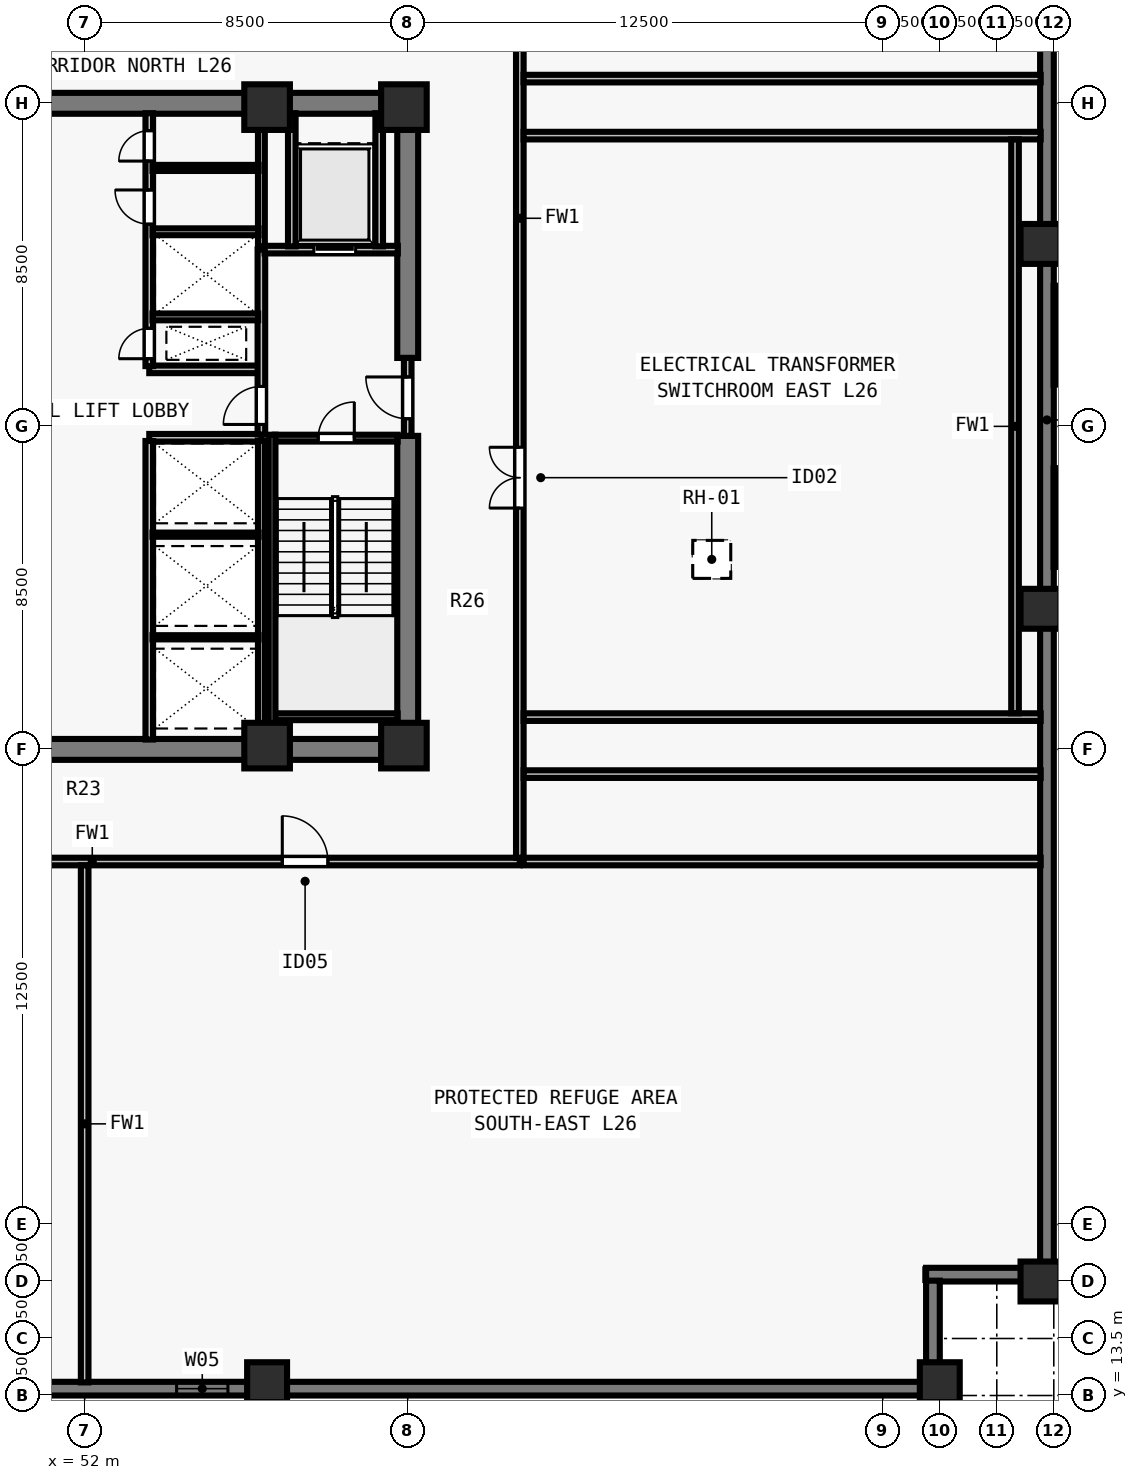
"""IFC4 building model, lengths in metres.
Left out: names, types, materials, properties, quantities, classifications, styles, units other than length and angle.
Written with IfcOpenShell. Run it as: python <this file> out.ifc"""

import sys

from ifc_helpers import new_model, si_unit, direction, frame, frame_2d, origin, origin_2d, place, context, subcontext, project, spatial, rectangle, extrude, element, fill, save


model = new_model("IFC4")
c1 = context("Model", 3, precision=1e-05, world=origin(), true_north=direction((0.0, 1.0)))
c2 = subcontext(c1, "Body", "Model", "MODEL_VIEW")
j1 = project(units=[si_unit("LENGTHUNIT", "METRE"), si_unit("PLANEANGLEUNIT", "RADIAN")], contexts=[c1])
p1 = place(None, origin())
s1 = spatial("IfcSite", under=j1, at=p1, CompositionType="ELEMENT")
p2 = place(p1, origin())
s2 = spatial("IfcBuilding", under=s1, at=p2, CompositionType="ELEMENT")
p3 = place(p2, frame((0.0, 0.0, 97.0)))
s3 = spatial("IfcBuildingStorey", under=s2, at=p3, CompositionType="ELEMENT", Elevation=97.0)
for number, where, z_axis, x_axis in (
    (1, (56.8, 30.6, 0.0), (0.0, 0.0, 1.0), (1.0, 0.0, 0.0)),
    (2, (60.4, 30.6, 0.0), (0.0, 0.0, 1.0), (1.0, 0.0, 0.0)),
    (3, (56.8, 47.4, 0.0), (0.0, 0.0, 1.0), (1.0, 0.0, 0.0)),
    (4, (60.4, 47.4, 0.0), (0.0, 0.0, 1.0), (1.0, 0.0, 0.0)),
):
    element("IfcColumn", number, at=place(p3, frame(where, z_axis=z_axis, x_axis=x_axis)), inside=s3, PredefinedType="COLUMN", context=c2, shape_type="SweptSolid", body=[
        extrude(rectangle(XDim=1.2, YDim=1.2, at=origin_2d()), origin(), (0.0, 0.0, 1.0), 4.5),
    ])
for number, where, z_axis, x_axis in (
    (5, (56.8, 13.85, 0.0), (0.0, 0.0, 1.0), (1.0, 0.0, 0.0)),
    (6, (74.5, 13.85, 0.0), (0.0, 0.0, 1.0), (1.0, 0.0, 0.0)),
    (7, (77.15, 16.5, 0.0), (0.0, 0.0, 1.0), (0.0, 1.0, 0.0)),
    (8, (77.15, 34.2, 0.0), (0.0, 0.0, 1.0), (0.0, 1.0, 0.0)),
    (9, (77.15, 43.8, 0.0), (0.0, 0.0, 1.0), (0.0, 1.0, 0.0)),
):
    element("IfcColumn", number, at=place(p3, frame(where, z_axis=z_axis, x_axis=x_axis)), inside=s3, PredefinedType="COLUMN", context=c2, shape_type="SweptSolid", body=[
        extrude(rectangle(XDim=1.05, YDim=1.05, at=origin_2d()), origin(), (0.0, 0.0, 1.0), 4.5),
    ])
p4 = place(p3, frame((77.32, 61.5, 0.0), z_axis=(0.0, 0.0, 1.0), x_axis=(0.0, -1.0, 0.0)))
e10 = element("IfcWall", 10, at=p4, inside=s3, PredefinedType="SOLIDWALL", context=c2, shape_type="SweptSolid", body=[
    extrude(rectangle(XDim=44.662, YDim=0.36, at=frame_2d((22.331, 0.0))), origin(), (0.0, 0.0, 1.0), 4.28),
])
p5 = place(p3, frame((77.5, 16.68, 0.0), z_axis=(0.0, 0.0, 1.0), x_axis=(-1.0, 0.0, 0.0)))
e11 = element("IfcWall", 11, at=p5, inside=s3, PredefinedType="SOLIDWALL", context=c2, shape_type="SweptSolid", body=[
    extrude(rectangle(XDim=3.36, YDim=0.36, at=frame_2d((1.68, 0.0))), origin(), (0.0, 0.0, 1.0), 4.28),
])
p6 = place(p3, frame((74.32, 16.522, 0.0), z_axis=(0.0, 0.0, 1.0), x_axis=(0.0, -1.0, 0.0)))
e12 = element("IfcWall", 12, at=p6, inside=s3, PredefinedType="SOLIDWALL", context=c2, shape_type="SweptSolid", body=[
    extrude(rectangle(XDim=2.684, YDim=0.36, at=frame_2d((1.342, 0.0))), origin(), (0.0, 0.0, 1.0), 4.28),
])
p7 = place(p3, frame((74.5, 13.68, 0.0), z_axis=(0.0, 0.0, 1.0), x_axis=(-1.0, 0.0, 0.0)))
e13 = element("IfcWall", 13, at=p7, inside=s3, PredefinedType="SOLIDWALL", context=c2, shape_type="SweptSolid", body=[
    extrude(rectangle(XDim=44.662, YDim=0.36, at=frame_2d((22.331, 0.0))), origin(), (0.0, 0.0, 1.0), 4.28),
])
p8 = place(p7, frame((18.731, 0.0, 0.8)))
e14 = element("IfcOpeningElement", 14, at=p8, cuts=e13, PredefinedType="OPENING", context=c2, shape_type="SweptSolid", body=[
    extrude(rectangle(XDim=1.35, YDim=1.53, at=frame_2d((0.675, 0.765))), frame((0.0, 0.19, 0.0), z_axis=(0.0, -1.0, 0.0), x_axis=(1.0, 0.0, 0.0)), (0.0, 0.0, 1.0), 0.38),
])
for number, where, z_axis, x_axis in (
    (15, (43.225, 30.5, 0.0), (0.0, 0.0, 1.0), (1.0, 0.0, 0.0)),
    (16, (43.225, 47.5, 0.0), (0.0, 0.0, 1.0), (1.0, 0.0, 0.0)),
):
    element("IfcWall", number, at=place(p3, frame(where, z_axis=z_axis, x_axis=x_axis)), inside=s3, PredefinedType="SHEAR", context=c2, shape_type="SweptSolid", body=[
        extrude(rectangle(XDim=17.55, YDim=0.55, at=frame_2d((8.775, 0.0))), origin(), (0.0, 0.0, 1.0), 4.28),
    ])
p9 = place(p3, frame((60.5, 30.765, 0.0), z_axis=(0.0, 0.0, 1.0), x_axis=(0.0, 1.0, 0.0)))
e17 = element("IfcWall", 17, at=p9, inside=s3, PredefinedType="SHEAR", context=c2, shape_type="SweptSolid", body=[
    extrude(rectangle(XDim=7.985, YDim=0.55, at=frame_2d((3.993, 0.0))), origin(), (0.0, 0.0, 1.0), 4.28),
])
p10 = place(p3, frame((60.5, 40.8, 0.0), z_axis=(0.0, 0.0, 1.0), x_axis=(0.0, 1.0, 0.0)))
e18 = element("IfcWall", 18, at=p10, inside=s3, PredefinedType="SHEAR", context=c2, shape_type="SweptSolid", body=[
    extrude(rectangle(XDim=6.435, YDim=0.55, at=frame_2d((3.218, 0.0))), origin(), (0.0, 0.0, 1.0), 4.28),
])
for number, where, z_axis, x_axis in (
    (19, (53.7, 38.7, 0.0), (0.0, 0.0, 1.0), (1.0, 0.0, 0.0)),
    (20, (53.7, 40.5, 0.0), (0.0, 0.0, 1.0), (1.0, 0.0, 0.0)),
):
    element("IfcWall", number, at=place(p3, frame(where, z_axis=z_axis, x_axis=x_axis)), inside=s3, PredefinedType="SOLIDWALL", context=c2, shape_type="SweptSolid", body=[
        extrude(rectangle(XDim=2.95, YDim=0.2, at=frame_2d((1.475, 0.0))), origin(), (0.0, 0.0, 1.0), 4.28),
    ])
p11 = place(p3, frame((53.7, 30.76, 0.0), z_axis=(0.0, 0.0, 1.0), x_axis=(0.0, 1.0, 0.0)))
e21 = element("IfcWall", 21, at=p11, inside=s3, PredefinedType="SOLIDWALL", context=c2, shape_type="SweptSolid", body=[
    extrude(rectangle(XDim=7.855, YDim=0.2, at=frame_2d((3.927, 0.0))), origin(), (0.0, 0.0, 1.0), 4.28),
])
p12 = place(p3, frame((53.7, 40.585, 0.0), z_axis=(0.0, 0.0, 1.0), x_axis=(0.0, 1.0, 0.0)))
e22 = element("IfcWall", 22, at=p12, inside=s3, PredefinedType="SOLIDWALL", context=c2, shape_type="SweptSolid", body=[
    extrude(rectangle(XDim=6.655, YDim=0.2, at=frame_2d((3.328, 0.0))), origin(), (0.0, 0.0, 1.0), 4.28),
])
p13 = place(p12, frame((0.195, 0.0, 0.0)))
e23 = element("IfcOpeningElement", 23, at=p13, cuts=e22, PredefinedType="OPENING", context=c2, shape_type="SweptSolid", body=[
    extrude(rectangle(XDim=0.8, YDim=2.08, at=frame_2d((0.4, 1.04))), frame((0.0, 0.11, 0.0), z_axis=(0.0, -1.0, 0.0), x_axis=(1.0, 0.0, 0.0)), (0.0, 0.0, 1.0), 0.22),
])
p14 = place(p12, frame((3.735, 0.0, 0.0)))
e24 = element("IfcOpeningElement", 24, at=p14, cuts=e22, PredefinedType="OPENING", context=c2, shape_type="SweptSolid", body=[
    extrude(rectangle(XDim=0.9, YDim=2.12, at=frame_2d((0.45, 1.06))), frame((0.0, 0.11, 0.0), z_axis=(0.0, -1.0, 0.0), x_axis=(1.0, 0.0, 0.0)), (0.0, 0.0, 1.0), 0.22),
])
p15 = place(p12, frame((5.395, 0.0, 0.0)))
e25 = element("IfcOpeningElement", 25, at=p15, cuts=e22, PredefinedType="OPENING", context=c2, shape_type="SweptSolid", body=[
    extrude(rectangle(XDim=0.8, YDim=2.1, at=frame_2d((0.4, 1.05))), frame((0.0, 0.11, 0.0), z_axis=(0.0, -1.0, 0.0), x_axis=(1.0, 0.0, 0.0)), (0.0, 0.0, 1.0), 0.22),
])
p16 = place(p3, frame((60.5, 38.75, 0.0), z_axis=(0.0, 0.0, 1.0), x_axis=(0.0, 1.0, 0.0)))
e26 = element("IfcWall", 26, at=p16, inside=s3, PredefinedType="SOLIDWALL", context=c2, shape_type="SweptSolid", body=[
    extrude(rectangle(XDim=2.05, YDim=0.2, at=frame_2d((1.025, 0.0))), origin(), (0.0, 0.0, 1.0), 4.28),
])
p17 = place(p16, frame((0.45, 0.0, 0.0)))
e27 = element("IfcOpeningElement", 27, at=p17, cuts=e26, PredefinedType="OPENING", context=c2, shape_type="SweptSolid", body=[
    extrude(rectangle(XDim=1.1, YDim=2.15, at=frame_2d((0.55, 1.075))), frame((0.0, 0.11, 0.0), z_axis=(0.0, -1.0, 0.0), x_axis=(1.0, 0.0, 0.0)), (0.0, 0.0, 1.0), 0.22),
])
p18 = place(p3, frame((56.65, 38.785, 0.0), z_axis=(0.0, 0.0, 1.0), x_axis=(0.0, 1.0, 0.0)))
e28 = element("IfcWall", 28, at=p18, inside=s3, PredefinedType="SOLIDWALL", context=c2, shape_type="SweptSolid", body=[
    extrude(rectangle(XDim=4.865, YDim=0.2, at=frame_2d((2.433, 0.0))), origin(), (0.0, 0.0, 1.0), 4.28),
])
p19 = place(p18, frame((0.265, 0.0, 0.0)))
e29 = element("IfcOpeningElement", 29, at=p19, cuts=e28, PredefinedType="OPENING", context=c2, shape_type="SweptSolid", body=[
    extrude(rectangle(XDim=1.0, YDim=2.15, at=frame_2d((0.5, 1.075))), frame((0.0, 0.11, 0.0), z_axis=(0.0, -1.0, 0.0), x_axis=(1.0, 0.0, 0.0)), (0.0, 0.0, 1.0), 0.22),
])
p20 = place(p3, frame((56.735, 43.65, 0.0), z_axis=(0.0, 0.0, 1.0), x_axis=(1.0, 0.0, 0.0)))
e30 = element("IfcWall", 30, at=p20, inside=s3, PredefinedType="SOLIDWALL", context=c2, shape_type="SweptSolid", body=[
    extrude(rectangle(XDim=3.505, YDim=0.2, at=frame_2d((1.752, 0.0))), origin(), (0.0, 0.0, 1.0), 4.28),
])
p21 = place(p20, frame((1.295, 0.0, 0.0)))
e31 = element("IfcOpeningElement", 31, at=p21, cuts=e30, PredefinedType="OPENING", context=c2, shape_type="SweptSolid", body=[
    extrude(rectangle(XDim=1.1, YDim=2.2, at=frame_2d((0.55, 1.1))), frame((0.0, 0.11, 0.0), z_axis=(0.0, -1.0, 0.0), x_axis=(1.0, 0.0, 0.0)), (0.0, 0.0, 1.0), 0.22),
])
for number, where, z_axis, x_axis in (
    (32, (57.45, 43.735, 0.0), (0.0, 0.0, 1.0), (0.0, 1.0, 0.0)),
    (33, (59.75, 43.735, 0.0), (0.0, 0.0, 1.0), (0.0, 1.0, 0.0)),
):
    element("IfcWall", number, at=place(p3, frame(where, z_axis=z_axis, x_axis=x_axis)), inside=s3, PredefinedType="SOLIDWALL", context=c2, shape_type="SweptSolid", body=[
        extrude(rectangle(XDim=3.505, YDim=0.2, at=frame_2d((1.752, 0.0))), origin(), (0.0, 0.0, 1.0), 4.28),
    ])
p22 = place(p3, frame((56.65, 30.76, 0.0), z_axis=(0.0, 0.0, 1.0), x_axis=(0.0, 1.0, 0.0)))
e34 = element("IfcWall", 34, at=p22, inside=s3, PredefinedType="SOLIDWALL", context=c2, shape_type="SweptSolid", body=[
    extrude(rectangle(XDim=7.855, YDim=0.18, at=frame_2d((3.927, 0.0))), origin(), (0.0, 0.0, 1.0), 4.28),
])
for number, where, z_axis, x_axis in (
    (35, (53.785, 33.45, 0.0), (0.0, 0.0, 1.0), (1.0, 0.0, 0.0)),
    (36, (53.785, 36.15, 0.0), (0.0, 0.0, 1.0), (1.0, 0.0, 0.0)),
):
    element("IfcWall", number, at=place(p3, frame(where, z_axis=z_axis, x_axis=x_axis)), inside=s3, PredefinedType="PARTITIONING", context=c2, shape_type="SweptSolid", body=[
        extrude(rectangle(XDim=2.79, YDim=0.11, at=frame_2d((1.395, 0.0))), origin(), (0.0, 0.0, 1.0), 4.28),
    ])
p23 = place(p3, frame((56.65, 43.735, 0.0), z_axis=(0.0, 0.0, 1.0), x_axis=(0.0, 1.0, 0.0)))
e37 = element("IfcWall", 37, at=p23, inside=s3, PredefinedType="SOLIDWALL", context=c2, shape_type="SweptSolid", body=[
    extrude(rectangle(XDim=3.505, YDim=0.18, at=frame_2d((1.752, 0.0))), origin(), (0.0, 0.0, 1.0), 4.28),
])
p24 = place(p3, frame((53.785, 41.88, 0.0), z_axis=(0.0, 0.0, 1.0), x_axis=(1.0, 0.0, 0.0)))
e38 = element("IfcWall", 38, at=p24, inside=s3, PredefinedType="SOLIDWALL", context=c2, shape_type="SweptSolid", body=[
    extrude(rectangle(XDim=2.78, YDim=0.18, at=frame_2d((1.39, 0.0))), origin(), (0.0, 0.0, 1.0), 4.28),
])
p25 = place(p3, frame((53.785, 44.12, 0.0), z_axis=(0.0, 0.0, 1.0), x_axis=(1.0, 0.0, 0.0)))
e39 = element("IfcWall", 39, at=p25, inside=s3, PredefinedType="SOLIDWALL", context=c2, shape_type="SweptSolid", body=[
    extrude(rectangle(XDim=2.79, YDim=0.18, at=frame_2d((1.395, 0.0))), origin(), (0.0, 0.0, 1.0), 4.28),
])
p26 = place(p3, frame((53.785, 45.8, 0.0), z_axis=(0.0, 0.0, 1.0), x_axis=(1.0, 0.0, 0.0)))
e40 = element("IfcWall", 40, at=p26, inside=s3, PredefinedType="PARTITIONING", context=c2, shape_type="SweptSolid", body=[
    extrude(rectangle(XDim=2.79, YDim=0.16, at=frame_2d((1.395, 0.0))), origin(), (0.0, 0.0, 1.0), 4.28),
])
p27 = place(p3, frame((40.55, 27.55, 0.0), z_axis=(0.0, 0.0, 1.0), x_axis=(1.0, 0.0, 0.0)))
e41 = element("IfcWall", 41, at=p27, inside=s3, PredefinedType="SOLIDWALL", context=c2, shape_type="SweptSolid", body=[
    extrude(rectangle(XDim=22.9, YDim=0.2, at=frame_2d((11.45, 0.0))), origin(), (0.0, 0.0, 1.0), 4.28),
])
p28 = place(p27, frame((5.45, 0.0, 0.0)))
e42 = element("IfcOpeningElement", 42, at=p28, cuts=e41, PredefinedType="OPENING", context=c2, shape_type="SweptSolid", body=[
    extrude(rectangle(XDim=1.2, YDim=2.15, at=frame_2d((0.6, 1.075))), frame((0.0, 0.11, 0.0), z_axis=(0.0, -1.0, 0.0), x_axis=(1.0, 0.0, 0.0)), (0.0, 0.0, 1.0), 0.22),
])
p29 = place(p27, frame((16.65, 0.0, 0.0)))
e43 = element("IfcOpeningElement", 43, at=p29, cuts=e41, PredefinedType="OPENING", context=c2, shape_type="SweptSolid", body=[
    extrude(rectangle(XDim=1.2, YDim=2.15, at=frame_2d((0.6, 1.075))), frame((0.0, 0.11, 0.0), z_axis=(0.0, -1.0, 0.0), x_axis=(1.0, 0.0, 0.0)), (0.0, 0.0, 1.0), 0.22),
])
p30 = place(p3, frame((63.45, 27.65, 0.0), z_axis=(0.0, 0.0, 1.0), x_axis=(0.0, 1.0, 0.0)))
e44 = element("IfcWall", 44, at=p30, inside=s3, PredefinedType="SOLIDWALL", context=c2, shape_type="SweptSolid", body=[
    extrude(rectangle(XDim=22.7, YDim=0.2, at=frame_2d((11.35, 0.0))), origin(), (0.0, 0.0, 1.0), 4.28),
])
p31 = place(p30, frame((9.2, 0.0, 0.0)))
e45 = element("IfcOpeningElement", 45, at=p31, cuts=e44, PredefinedType="OPENING", context=c2, shape_type="SweptSolid", body=[
    extrude(rectangle(XDim=1.6, YDim=2.2, at=frame_2d((0.8, 1.1))), frame((0.0, 0.11, 0.0), z_axis=(0.0, -1.0, 0.0), x_axis=(1.0, 0.0, 0.0)), (0.0, 0.0, 1.0), 0.22),
])
p32 = place(p3, frame((63.55, 29.85, 0.0), z_axis=(0.0, 0.0, 1.0), x_axis=(1.0, 0.0, 0.0)))
e46 = element("IfcWall", 46, at=p32, inside=s3, PredefinedType="SOLIDWALL", context=c2, shape_type="SweptSolid", body=[
    extrude(rectangle(XDim=13.605, YDim=0.2, at=frame_2d((6.802, 0.0))), origin(), (0.0, 0.0, 1.0), 4.28),
])
for number, where, z_axis, x_axis in (
    (47, (63.55, 31.35, 0.0), (0.0, 0.0, 1.0), (1.0, 0.0, 0.0)),
    (48, (63.55, 46.65, 0.0), (0.0, 0.0, 1.0), (1.0, 0.0, 0.0)),
):
    element("IfcWall", number, at=place(p3, frame(where, z_axis=z_axis, x_axis=x_axis)), inside=s3, PredefinedType="SOLIDWALL", context=c2, shape_type="SweptSolid", body=[
        extrude(rectangle(XDim=13.605, YDim=0.2, at=frame_2d((6.802, 0.0))), origin(), (0.0, 0.0, 1.0), 2.455),
    ])
p33 = place(p3, frame((63.55, 48.15, 0.0), z_axis=(0.0, 0.0, 1.0), x_axis=(1.0, 0.0, 0.0)))
e49 = element("IfcWall", 49, at=p33, inside=s3, PredefinedType="SOLIDWALL", context=c2, shape_type="SweptSolid", body=[
    extrude(rectangle(XDim=13.605, YDim=0.2, at=frame_2d((6.802, 0.0))), origin(), (0.0, 0.0, 1.0), 4.28),
])
p34 = place(p3, frame((76.48, 31.45, 0.0), z_axis=(0.0, 0.0, 1.0), x_axis=(0.0, 1.0, 0.0)))
e50 = element("IfcWall", 50, at=p34, inside=s3, PredefinedType="SOLIDWALL", context=c2, shape_type="SweptSolid", body=[
    extrude(rectangle(XDim=15.1, YDim=0.2, at=frame_2d((7.55, 0.0))), origin(), (0.0, 0.0, 1.0), 4.28),
])
for number, where, z_axis, x_axis in (
    (51, (52.0, 13.845, 0.0), (0.0, 0.0, 1.0), (0.0, 1.0, 0.0)),
    (52, (63.55, 27.55, 0.0), (0.0, 0.0, 1.0), (1.0, 0.0, 0.0)),
):
    element("IfcWall", number, at=place(p3, frame(where, z_axis=z_axis, x_axis=x_axis)), inside=s3, PredefinedType="SOLIDWALL", context=c2, shape_type="SweptSolid", body=[
        extrude(rectangle(XDim=13.605, YDim=0.2, at=frame_2d((6.802, 0.0))), origin(), (0.0, 0.0, 1.0), 3.849),
    ])
p35 = place(p3, frame((57.005, 38.69, 0.0), z_axis=(0.0, 0.0, 1.0), x_axis=(1.0, 0.0, 0.0)))
e53 = element("IfcWall", 53, at=p35, inside=s3, PredefinedType="SOLIDWALL", context=c2, shape_type="SweptSolid", body=[
    extrude(rectangle(XDim=3.23, YDim=0.18, at=frame_2d((1.615, 0.0))), origin(), (0.0, 0.0, 1.0), 4.28),
])
p36 = place(p35, frame((1.14, 0.0, 0.0)))
e54 = element("IfcOpeningElement", 54, at=p36, cuts=e53, PredefinedType="OPENING", context=c2, shape_type="SweptSolid", body=[
    extrude(rectangle(XDim=0.95, YDim=2.15, at=frame_2d((0.475, 1.075))), frame((0.0, 0.1, 0.0), z_axis=(0.0, -1.0, 0.0), x_axis=(1.0, 0.0, 0.0)), (0.0, 0.0, 1.0), 0.2),
])
p37 = place(p3, frame((57.005, 31.36, 0.0), z_axis=(0.0, 0.0, 1.0), x_axis=(1.0, 0.0, 0.0)))
e55 = element("IfcWall", 55, at=p37, inside=s3, PredefinedType="SOLIDWALL", context=c2, shape_type="SweptSolid", body=[
    extrude(rectangle(XDim=3.23, YDim=0.18, at=frame_2d((1.615, 0.0))), origin(), (0.0, 0.0, 1.0), 4.28),
])
p38 = place(p3, frame((56.93, 38.78, 0.0), z_axis=(0.0, 0.0, 1.0), x_axis=(0.0, -1.0, 0.0)))
e56 = element("IfcWall", 56, at=p38, inside=s3, PredefinedType="SOLIDWALL", context=c2, shape_type="SweptSolid", body=[
    extrude(rectangle(XDim=8.017, YDim=0.18, at=frame_2d((4.009, 0.0))), origin(), (0.0, 0.0, 1.0), 4.28),
])
p39 = place(p3, frame((0.0, 0.0, -0.26)))
p40 = place(p39, frame((68.5, 35.5, 0.0)))
p41 = place(p40, frame((0.0, 0.0, 0.21)))
e57 = element("IfcDoor", 57, at=p41, inside=s3, OperationType="SINGLE_SWING_LEFT", PredefinedType="TRAPDOOR", context=c2, shape_type="SweptSolid", body=[
    extrude(rectangle(XDim=1.0, YDim=1.0, at=origin_2d()), origin(), (0.0, 0.0, 1.0), 0.05),
])
p42 = place(p8, origin())
e58 = element("IfcWindow", 58, at=p42, inside=s3, PartitioningType="SINGLE_PANEL", PredefinedType="WINDOW", context=c2, shape_type="SweptSolid", body=[
    extrude(rectangle(XDim=1.35, YDim=1.53, at=frame_2d((0.675, 0.765))), frame((0.0, -0.04, 0.0), z_axis=(0.0, -1.0, 0.0), x_axis=(1.0, 0.0, 0.0)), (0.0, 0.0, 1.0), 0.06),
])
fill(e14, e58)
p43 = place(p17, origin())
e59 = element("IfcDoor", 59, at=p43, inside=s3, OperationType="SINGLE_SWING_RIGHT", PredefinedType="DOOR", context=c2, shape_type="SweptSolid", body=[
    extrude(rectangle(XDim=1.1, YDim=2.15, at=frame_2d((0.55, 1.075))), frame((0.0, 0.025, 0.0), z_axis=(0.0, -1.0, 0.0), x_axis=(1.0, 0.0, 0.0)), (0.0, 0.0, 1.0), 0.05),
])
fill(e27, e59)
p44 = place(p19, origin())
e60 = element("IfcDoor", 60, at=p44, inside=s3, OperationType="SINGLE_SWING_LEFT", PredefinedType="DOOR", context=c2, shape_type="SweptSolid", body=[
    extrude(rectangle(XDim=1.0, YDim=2.15, at=frame_2d((0.5, 1.075))), frame((0.0, 0.025, 0.0), z_axis=(0.0, -1.0, 0.0), x_axis=(1.0, 0.0, 0.0)), (0.0, 0.0, 1.0), 0.05),
])
fill(e29, e60)
p45 = place(p21, origin())
e61 = element("IfcDoor", 61, at=p45, inside=s3, OperationType="SLIDING_TO_LEFT", PredefinedType="DOOR", context=c2, shape_type="SweptSolid", body=[
    extrude(rectangle(XDim=1.1, YDim=2.2, at=frame_2d((0.55, 1.1))), frame((0.0, 0.025, 0.0), z_axis=(0.0, -1.0, 0.0), x_axis=(1.0, 0.0, 0.0)), (0.0, 0.0, 1.0), 0.05),
])
fill(e31, e61)
p46 = place(p13, origin())
e62 = element("IfcDoor", 62, at=p46, inside=s3, OperationType="SINGLE_SWING_LEFT", PredefinedType="DOOR", context=c2, shape_type="SweptSolid", body=[
    extrude(rectangle(XDim=0.8, YDim=2.08, at=frame_2d((0.4, 1.04))), frame((0.0, 0.025, 0.0), z_axis=(0.0, -1.0, 0.0), x_axis=(1.0, 0.0, 0.0)), (0.0, 0.0, 1.0), 0.05),
])
fill(e23, e62)
p47 = place(p14, origin())
e63 = element("IfcDoor", 63, at=p47, inside=s3, OperationType="SINGLE_SWING_RIGHT", PredefinedType="DOOR", context=c2, shape_type="SweptSolid", body=[
    extrude(rectangle(XDim=0.9, YDim=2.12, at=frame_2d((0.45, 1.06))), frame((0.0, 0.025, 0.0), z_axis=(0.0, -1.0, 0.0), x_axis=(1.0, 0.0, 0.0)), (0.0, 0.0, 1.0), 0.05),
])
fill(e24, e63)
p48 = place(p15, origin())
e64 = element("IfcDoor", 64, at=p48, inside=s3, OperationType="SINGLE_SWING_LEFT", PredefinedType="DOOR", context=c2, shape_type="SweptSolid", body=[
    extrude(rectangle(XDim=0.8, YDim=2.1, at=frame_2d((0.4, 1.05))), frame((0.0, 0.025, 0.0), z_axis=(0.0, -1.0, 0.0), x_axis=(1.0, 0.0, 0.0)), (0.0, 0.0, 1.0), 0.05),
])
fill(e25, e64)
p49 = place(p29, origin())
e65 = element("IfcDoor", 65, at=p49, inside=s3, OperationType="SINGLE_SWING_LEFT", PredefinedType="DOOR", context=c2, shape_type="SweptSolid", body=[
    extrude(rectangle(XDim=1.2, YDim=2.15, at=frame_2d((0.6, 1.075))), frame((0.0, 0.025, 0.0), z_axis=(0.0, -1.0, 0.0), x_axis=(1.0, 0.0, 0.0)), (0.0, 0.0, 1.0), 0.05),
])
fill(e43, e65)
p50 = place(p31, origin())
e66 = element("IfcDoor", 66, at=p50, inside=s3, OperationType="DOUBLE_DOOR_SINGLE_SWING", PredefinedType="DOOR", context=c2, shape_type="SweptSolid", body=[
    extrude(rectangle(XDim=1.6, YDim=2.2, at=frame_2d((0.8, 1.1))), frame((0.0, 0.025, 0.0), z_axis=(0.0, -1.0, 0.0), x_axis=(1.0, 0.0, 0.0)), (0.0, 0.0, 1.0), 0.05),
])
fill(e45, e66)
p51 = place(p36, origin())
e67 = element("IfcDoor", 67, at=p51, inside=s3, OperationType="SINGLE_SWING_RIGHT", PredefinedType="DOOR", context=c2, shape_type="SweptSolid", body=[
    extrude(rectangle(XDim=0.95, YDim=2.15, at=frame_2d((0.475, 1.075))), frame((0.0, 0.025, 0.0), z_axis=(0.0, -1.0, 0.0), x_axis=(1.0, 0.0, 0.0)), (0.0, 0.0, 1.0), 0.05),
])
fill(e54, e67)
save(model, sys.argv[1])
